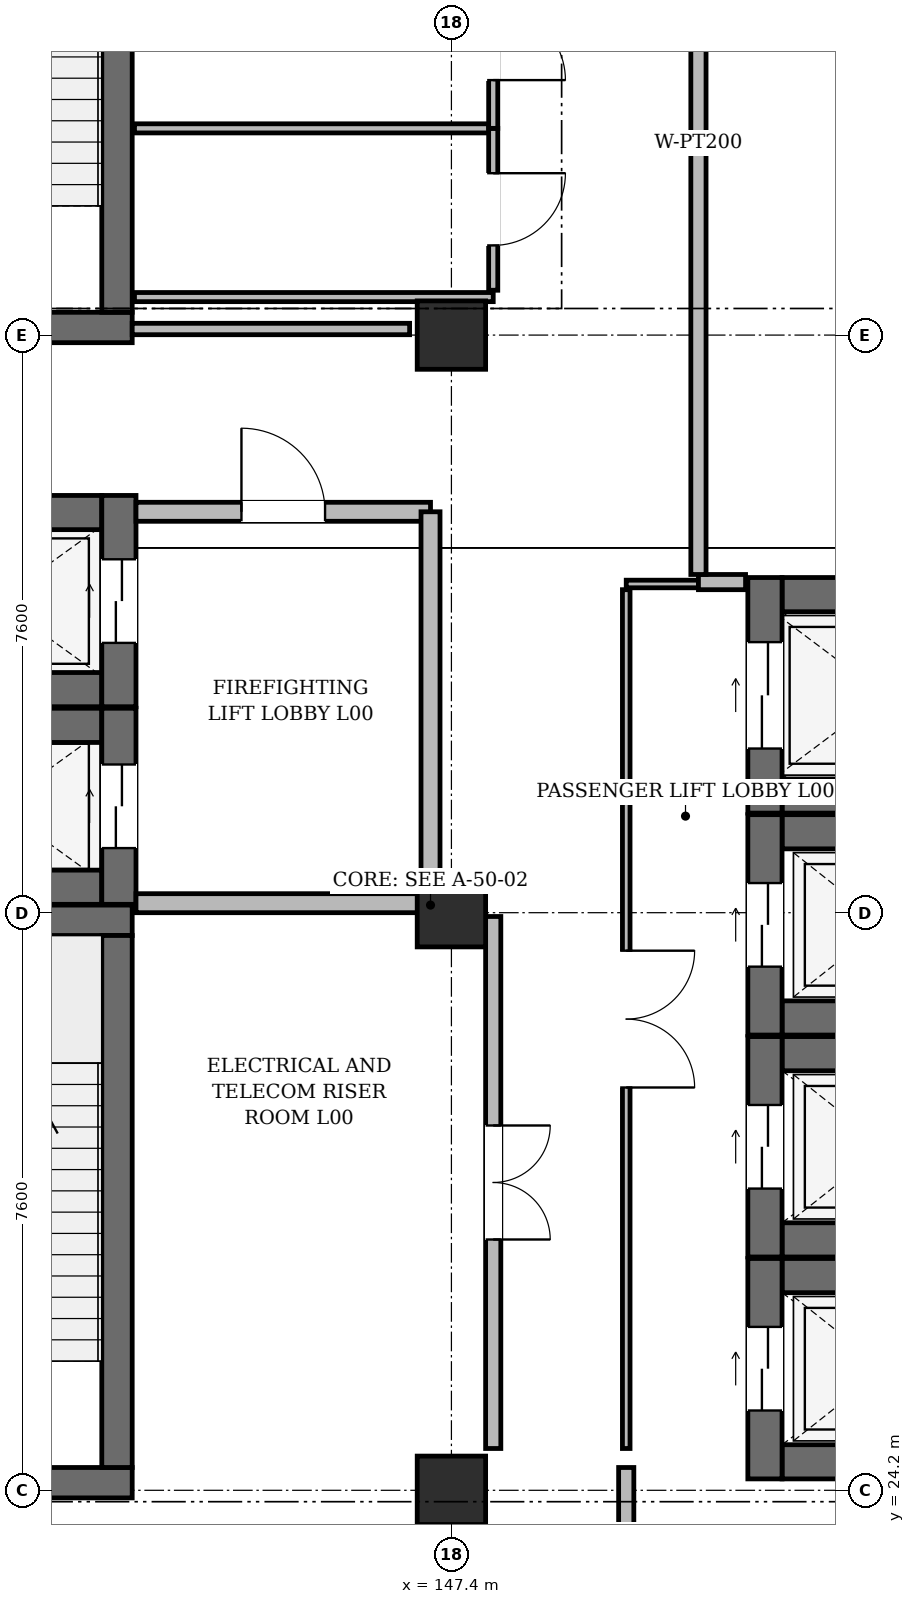
"""IFC4 building model, lengths in metres.
Left out: names, types, materials, properties, quantities, classifications, styles, units other than length and angle.
Written with IfcOpenShell. Run it as: python <this file> out.ifc"""

import sys

from ifc_helpers import new_model, si_unit, direction, frame, frame_2d, origin, origin_2d, place, context, subcontext, project, spatial, rectangle, extrude, element, fill, save


model = new_model("IFC4")
c1 = context("Model", 3, precision=1e-05, world=origin(), true_north=direction((0.0, 1.0)))
c2 = subcontext(c1, "Body", "Model", "MODEL_VIEW")
j1 = project(units=[si_unit("LENGTHUNIT", "METRE"), si_unit("PLANEANGLEUNIT", "RADIAN")], contexts=[c1])
p1 = place(None, origin())
s1 = spatial("IfcSite", under=j1, at=p1, CompositionType="ELEMENT")
p2 = place(p1, origin())
s2 = spatial("IfcBuilding", under=s1, at=p2, CompositionType="ELEMENT")
p3 = place(p2, origin())
s3 = spatial("IfcBuildingStorey", under=s2, at=p3, CompositionType="ELEMENT", Elevation=0.0)
for number, where, z_axis, x_axis in (
    (1, (147.4, 24.2, 0.0), (0.0, 0.0, 1.0), (1.0, 0.0, 0.0)),
    (2, (147.4, 31.8, 0.0), (0.0, 0.0, 1.0), (1.0, 0.0, 0.0)),
    (3, (147.4, 39.4, 0.0), (0.0, 0.0, 1.0), (1.0, 0.0, 0.0)),
):
    element("IfcColumn", number, at=place(p3, frame(where, z_axis=z_axis, x_axis=x_axis)), inside=s3, PredefinedType="COLUMN", context=c2, shape_type="SweptSolid", body=[
        extrude(rectangle(XDim=0.9, YDim=0.9, at=origin_2d()), origin(), (0.0, 0.0, 1.0), 5.1),
    ])
p4 = place(p3, frame((139.4, 24.3, 0.0), z_axis=(0.0, 0.0, 1.0), x_axis=(1.0, 0.0, 0.0)))
e4 = element("IfcWall", 4, at=p4, inside=s3, PredefinedType="SHEAR", context=c2, shape_type="SweptSolid", body=[
    extrude(rectangle(XDim=3.8, YDim=0.4, at=frame_2d((1.9, 0.0))), origin(), (0.0, 0.0, 1.0), 5.1),
])
p5 = place(p4, frame((1.3, 0.0, 0.0)))
e5 = element("IfcOpeningElement", 5, at=p5, cuts=e4, PredefinedType="OPENING", context=c2, shape_type="SweptSolid", body=[
    extrude(rectangle(XDim=1.2, YDim=2.2, at=frame_2d((0.6, 1.1))), frame((0.0, 0.212, 0.0), z_axis=(0.0, -1.0, 0.0), x_axis=(1.0, 0.0, 0.0)), (0.0, 0.0, 1.0), 0.424),
])
p6 = place(p3, frame((139.4, 31.7, 0.0), z_axis=(0.0, 0.0, 1.0), x_axis=(1.0, 0.0, 0.0)))
e6 = element("IfcWall", 6, at=p6, inside=s3, PredefinedType="SHEAR", context=c2, shape_type="SweptSolid", body=[
    extrude(rectangle(XDim=3.8, YDim=0.4, at=frame_2d((1.9, 0.0))), origin(), (0.0, 0.0, 1.0), 5.1),
])
p7 = place(p3, frame((143.0, 24.5, 0.0), z_axis=(0.0, 0.0, 1.0), x_axis=(0.0, 1.0, 0.0)))
e7 = element("IfcWall", 7, at=p7, inside=s3, PredefinedType="SHEAR", context=c2, shape_type="SweptSolid", body=[
    extrude(rectangle(XDim=7.0, YDim=0.4, at=frame_2d((3.5, 0.0))), origin(), (0.0, 0.0, 1.0), 5.1),
])
p8 = place(p3, frame((139.4, 39.5, 0.0), z_axis=(0.0, 0.0, 1.0), x_axis=(1.0, 0.0, 0.0)))
e8 = element("IfcWall", 8, at=p8, inside=s3, PredefinedType="SHEAR", context=c2, shape_type="SweptSolid", body=[
    extrude(rectangle(XDim=3.8, YDim=0.4, at=frame_2d((1.9, 0.0))), origin(), (0.0, 0.0, 1.0), 5.1),
])
p9 = place(p8, frame((1.3, 0.0, 0.0)))
e9 = element("IfcOpeningElement", 9, at=p9, cuts=e8, PredefinedType="OPENING", context=c2, shape_type="SweptSolid", body=[
    extrude(rectangle(XDim=1.2, YDim=2.2, at=frame_2d((0.6, 1.1))), frame((0.0, 0.212, 0.0), z_axis=(0.0, -1.0, 0.0), x_axis=(1.0, 0.0, 0.0)), (0.0, 0.0, 1.0), 0.424),
])
p10 = place(p3, frame((143.0, 39.7, 0.0), z_axis=(0.0, 0.0, 1.0), x_axis=(0.0, 1.0, 0.0)))
e10 = element("IfcWall", 10, at=p10, inside=s3, PredefinedType="SHEAR", context=c2, shape_type="SweptSolid", body=[
    extrude(rectangle(XDim=7.0, YDim=0.4, at=frame_2d((3.5, 0.0))), origin(), (0.0, 0.0, 1.0), 5.1),
])
for number, where, z_axis, x_axis in (
    (11, (140.06, 32.135, 0.0), (0.0, 0.0, 1.0), (1.0, 0.0, 0.0)),
    (12, (140.06, 34.265, 0.0), (0.0, 0.0, 1.0), (1.0, 0.0, 0.0)),
):
    element("IfcWall", number, at=place(p3, frame(where, z_axis=z_axis, x_axis=x_axis)), inside=s3, PredefinedType="SHEAR", context=c2, shape_type="SweptSolid", body=[
        extrude(rectangle(XDim=2.74, YDim=0.45, at=frame_2d((1.37, 0.0))), origin(), (0.0, 0.0, 1.0), 5.1),
    ])
p11 = place(p3, frame((143.025, 31.91, 0.0), z_axis=(0.0, 0.0, 1.0), x_axis=(0.0, 1.0, 0.0)))
e13 = element("IfcWall", 13, at=p11, inside=s3, PredefinedType="SHEAR", context=c2, shape_type="SweptSolid", body=[
    extrude(rectangle(XDim=2.58, YDim=0.45, at=frame_2d((1.29, 0.0))), origin(), (0.0, 0.0, 1.0), 5.1),
])
p12 = place(p11, frame((0.74, 0.0, 0.0)))
e14 = element("IfcOpeningElement", 14, at=p12, cuts=e13, PredefinedType="OPENING", context=c2, shape_type="SweptSolid", body=[
    extrude(rectangle(XDim=1.1, YDim=2.2, at=frame_2d((0.55, 1.1))), frame((0.0, 0.237, 0.0), z_axis=(0.0, -1.0, 0.0), x_axis=(1.0, 0.0, 0.0)), (0.0, 0.0, 1.0), 0.474),
])
for number, where, z_axis, x_axis in (
    (15, (140.06, 34.735, 0.0), (0.0, 0.0, 1.0), (1.0, 0.0, 0.0)),
    (16, (140.06, 37.065, 0.0), (0.0, 0.0, 1.0), (1.0, 0.0, 0.0)),
):
    element("IfcWall", number, at=place(p3, frame(where, z_axis=z_axis, x_axis=x_axis)), inside=s3, PredefinedType="SHEAR", context=c2, shape_type="SweptSolid", body=[
        extrude(rectangle(XDim=2.74, YDim=0.45, at=frame_2d((1.37, 0.0))), origin(), (0.0, 0.0, 1.0), 5.1),
    ])
p13 = place(p3, frame((143.025, 34.51, 0.0), z_axis=(0.0, 0.0, 1.0), x_axis=(0.0, 1.0, 0.0)))
e17 = element("IfcWall", 17, at=p13, inside=s3, PredefinedType="SHEAR", context=c2, shape_type="SweptSolid", body=[
    extrude(rectangle(XDim=2.78, YDim=0.45, at=frame_2d((1.39, 0.0))), origin(), (0.0, 0.0, 1.0), 5.1),
])
p14 = place(p13, frame((0.84, 0.0, 0.0)))
e18 = element("IfcOpeningElement", 18, at=p14, cuts=e17, PredefinedType="OPENING", context=c2, shape_type="SweptSolid", body=[
    extrude(rectangle(XDim=1.1, YDim=2.2, at=frame_2d((0.55, 1.1))), frame((0.0, 0.237, 0.0), z_axis=(0.0, -1.0, 0.0), x_axis=(1.0, 0.0, 0.0)), (0.0, 0.0, 1.0), 0.474),
])
for number, where, z_axis, x_axis in (
    (19, (151.75, 24.575, 0.0), (0.0, 0.0, 1.0), (1.0, 0.0, 0.0)),
    (20, (151.75, 27.025, 0.0), (0.0, 0.0, 1.0), (1.0, 0.0, 0.0)),
):
    element("IfcWall", number, at=place(p3, frame(where, z_axis=z_axis, x_axis=x_axis)), inside=s3, PredefinedType="SHEAR", context=c2, shape_type="SweptSolid", body=[
        extrude(rectangle(XDim=2.7, YDim=0.45, at=frame_2d((1.35, 0.0))), origin(), (0.0, 0.0, 1.0), 5.1),
    ])
p15 = place(p3, frame((151.525, 24.35, 0.0), z_axis=(0.0, 0.0, 1.0), x_axis=(0.0, 1.0, 0.0)))
e21 = element("IfcWall", 21, at=p15, inside=s3, PredefinedType="SHEAR", context=c2, shape_type="SweptSolid", body=[
    extrude(rectangle(XDim=2.9, YDim=0.45, at=frame_2d((1.45, 0.0))), origin(), (0.0, 0.0, 1.0), 5.1),
])
p16 = place(p15, frame((0.9, 0.0, 0.0)))
e22 = element("IfcOpeningElement", 22, at=p16, cuts=e21, PredefinedType="OPENING", context=c2, shape_type="SweptSolid", body=[
    extrude(rectangle(XDim=1.1, YDim=2.2, at=frame_2d((0.55, 1.1))), frame((0.0, 0.237, 0.0), z_axis=(0.0, -1.0, 0.0), x_axis=(1.0, 0.0, 0.0)), (0.0, 0.0, 1.0), 0.474),
])
for number, where, z_axis, x_axis in (
    (23, (151.75, 27.495, 0.0), (0.0, 0.0, 1.0), (1.0, 0.0, 0.0)),
    (24, (151.75, 29.945, 0.0), (0.0, 0.0, 1.0), (1.0, 0.0, 0.0)),
):
    element("IfcWall", number, at=place(p3, frame(where, z_axis=z_axis, x_axis=x_axis)), inside=s3, PredefinedType="SHEAR", context=c2, shape_type="SweptSolid", body=[
        extrude(rectangle(XDim=2.7, YDim=0.45, at=frame_2d((1.35, 0.0))), origin(), (0.0, 0.0, 1.0), 5.1),
    ])
p17 = place(p3, frame((151.525, 27.27, 0.0), z_axis=(0.0, 0.0, 1.0), x_axis=(0.0, 1.0, 0.0)))
e25 = element("IfcWall", 25, at=p17, inside=s3, PredefinedType="SHEAR", context=c2, shape_type="SweptSolid", body=[
    extrude(rectangle(XDim=2.9, YDim=0.45, at=frame_2d((1.45, 0.0))), origin(), (0.0, 0.0, 1.0), 5.1),
])
p18 = place(p17, frame((0.9, 0.0, 0.0)))
e26 = element("IfcOpeningElement", 26, at=p18, cuts=e25, PredefinedType="OPENING", context=c2, shape_type="SweptSolid", body=[
    extrude(rectangle(XDim=1.1, YDim=2.2, at=frame_2d((0.55, 1.1))), frame((0.0, 0.237, 0.0), z_axis=(0.0, -1.0, 0.0), x_axis=(1.0, 0.0, 0.0)), (0.0, 0.0, 1.0), 0.474),
])
for number, where, z_axis, x_axis in (
    (27, (151.75, 30.415, 0.0), (0.0, 0.0, 1.0), (1.0, 0.0, 0.0)),
    (28, (151.75, 32.865, 0.0), (0.0, 0.0, 1.0), (1.0, 0.0, 0.0)),
):
    element("IfcWall", number, at=place(p3, frame(where, z_axis=z_axis, x_axis=x_axis)), inside=s3, PredefinedType="SHEAR", context=c2, shape_type="SweptSolid", body=[
        extrude(rectangle(XDim=2.7, YDim=0.45, at=frame_2d((1.35, 0.0))), origin(), (0.0, 0.0, 1.0), 5.1),
    ])
p19 = place(p3, frame((151.525, 30.19, 0.0), z_axis=(0.0, 0.0, 1.0), x_axis=(0.0, 1.0, 0.0)))
e29 = element("IfcWall", 29, at=p19, inside=s3, PredefinedType="SHEAR", context=c2, shape_type="SweptSolid", body=[
    extrude(rectangle(XDim=2.9, YDim=0.45, at=frame_2d((1.45, 0.0))), origin(), (0.0, 0.0, 1.0), 5.1),
])
p20 = place(p19, frame((0.9, 0.0, 0.0)))
e30 = element("IfcOpeningElement", 30, at=p20, cuts=e29, PredefinedType="OPENING", context=c2, shape_type="SweptSolid", body=[
    extrude(rectangle(XDim=1.1, YDim=2.2, at=frame_2d((0.55, 1.1))), frame((0.0, 0.237, 0.0), z_axis=(0.0, -1.0, 0.0), x_axis=(1.0, 0.0, 0.0)), (0.0, 0.0, 1.0), 0.474),
])
for number, where, z_axis, x_axis in (
    (31, (151.75, 33.335, 0.0), (0.0, 0.0, 1.0), (1.0, 0.0, 0.0)),
    (32, (151.75, 35.985, 0.0), (0.0, 0.0, 1.0), (1.0, 0.0, 0.0)),
):
    element("IfcWall", number, at=place(p3, frame(where, z_axis=z_axis, x_axis=x_axis)), inside=s3, PredefinedType="SHEAR", context=c2, shape_type="SweptSolid", body=[
        extrude(rectangle(XDim=2.7, YDim=0.45, at=frame_2d((1.35, 0.0))), origin(), (0.0, 0.0, 1.0), 5.1),
    ])
p21 = place(p3, frame((151.525, 33.11, 0.0), z_axis=(0.0, 0.0, 1.0), x_axis=(0.0, 1.0, 0.0)))
e33 = element("IfcWall", 33, at=p21, inside=s3, PredefinedType="SHEAR", context=c2, shape_type="SweptSolid", body=[
    extrude(rectangle(XDim=3.1, YDim=0.45, at=frame_2d((1.55, 0.0))), origin(), (0.0, 0.0, 1.0), 5.1),
])
p22 = place(p21, frame((0.85, 0.0, 0.0)))
e34 = element("IfcOpeningElement", 34, at=p22, cuts=e33, PredefinedType="OPENING", context=c2, shape_type="SweptSolid", body=[
    extrude(rectangle(XDim=1.4, YDim=2.3, at=frame_2d((0.7, 1.15))), frame((0.0, 0.237, 0.0), z_axis=(0.0, -1.0, 0.0), x_axis=(1.0, 0.0, 0.0)), (0.0, 0.0, 1.0), 0.474),
])
p23 = place(p3, frame((143.25, 37.075, 0.0), z_axis=(0.0, 0.0, 1.0), x_axis=(1.0, 0.0, 0.0)))
e35 = element("IfcWall", 35, at=p23, inside=s3, PredefinedType="SOLIDWALL", context=c2, shape_type="SweptSolid", body=[
    extrude(rectangle(XDim=3.875, YDim=0.25, at=frame_2d((1.938, 0.0))), origin(), (0.0, 0.0, 1.0), 5.005),
])
p24 = place(p23, frame((1.387, 0.0, 0.0)))
e36 = element("IfcOpeningElement", 36, at=p24, cuts=e35, PredefinedType="OPENING", context=c2, shape_type="SweptSolid", body=[
    extrude(rectangle(XDim=1.1, YDim=2.2, at=frame_2d((0.55, 1.1))), frame((0.0, 0.137, 0.0), z_axis=(0.0, -1.0, 0.0), x_axis=(1.0, 0.0, 0.0)), (0.0, 0.0, 1.0), 0.274),
])
p25 = place(p3, frame((143.25, 31.925, 0.0), z_axis=(0.0, 0.0, 1.0), x_axis=(1.0, 0.0, 0.0)))
e37 = element("IfcWall", 37, at=p25, inside=s3, PredefinedType="SOLIDWALL", context=c2, shape_type="SweptSolid", body=[
    extrude(rectangle(XDim=3.875, YDim=0.25, at=frame_2d((1.938, 0.0))), origin(), (0.0, 0.0, 1.0), 4.335),
])
p26 = place(p3, frame((147.125, 31.925, 0.0), z_axis=(0.0, 0.0, 1.0), x_axis=(0.0, 1.0, 0.0)))
e38 = element("IfcWall", 38, at=p26, inside=s3, PredefinedType="SOLIDWALL", context=c2, shape_type="SweptSolid", body=[
    extrude(rectangle(XDim=5.15, YDim=0.25, at=frame_2d((2.575, 0.0))), origin(), (0.0, 0.0, 1.0), 4.335),
])
p27 = place(p3, frame((143.23, 39.9, 0.0), z_axis=(0.0, 0.0, 1.0), x_axis=(1.0, 0.0, 0.0)))
e39 = element("IfcWall", 39, at=p27, inside=s3, PredefinedType="PARTITIONING", context=c2, shape_type="SweptSolid", body=[
    extrude(rectangle(XDim=4.72, YDim=0.12, at=frame_2d((2.36, 0.0))), origin(), (0.0, 0.0, 1.0), 5.005),
])
p28 = place(p3, frame((147.95, 31.75, 0.0), z_axis=(0.0, 0.0, 1.0), x_axis=(0.0, -1.0, 0.0)))
e40 = element("IfcWall", 40, at=p28, inside=s3, PredefinedType="PARTITIONING", context=c2, shape_type="SweptSolid", body=[
    extrude(rectangle(XDim=7.0, YDim=0.2, at=frame_2d((3.5, 0.0))), origin(), (0.0, 0.0, 1.0), 5.005),
])
p29 = place(p28, frame((2.75, 0.0, 0.0)))
e41 = element("IfcOpeningElement", 41, at=p29, cuts=e40, PredefinedType="OPENING", context=c2, shape_type="SweptSolid", body=[
    extrude(rectangle(XDim=1.5, YDim=2.2, at=frame_2d((0.75, 1.1))), frame((0.0, 0.112, 0.0), z_axis=(0.0, -1.0, 0.0), x_axis=(1.0, 0.0, 0.0)), (0.0, 0.0, 1.0), 0.224),
])
p30 = place(p3, frame((149.7, 24.75, 0.0), z_axis=(0.0, 0.0, 1.0), x_axis=(0.0, 1.0, 0.0)))
e42 = element("IfcWall", 42, at=p30, inside=s3, PredefinedType="PARTITIONING", context=c2, shape_type="SweptSolid", body=[
    extrude(rectangle(XDim=11.3, YDim=0.1, at=frame_2d((5.65, 0.0))), origin(), (0.0, 0.0, 1.0), 5.005),
])
p31 = place(p30, frame((4.75, 0.0, 0.0)))
e43 = element("IfcOpeningElement", 43, at=p31, cuts=e42, PredefinedType="OPENING", context=c2, shape_type="SweptSolid", body=[
    extrude(rectangle(XDim=1.8, YDim=2.4, at=frame_2d((0.9, 1.2))), frame((0.0, 0.062, 0.0), z_axis=(0.0, -1.0, 0.0), x_axis=(1.0, 0.0, 0.0)), (0.0, 0.0, 1.0), 0.124),
])
p32 = place(p3, frame((149.7, 36.125, 0.0), z_axis=(0.0, 0.0, 1.0), x_axis=(1.0, 0.0, 0.0)))
e44 = element("IfcWall", 44, at=p32, inside=s3, PredefinedType="PARTITIONING", context=c2, shape_type="SweptSolid", body=[
    extrude(rectangle(XDim=0.95, YDim=0.1, at=frame_2d((0.475, 0.0))), origin(), (0.0, 0.0, 1.0), 5.005),
])
p33 = place(p3, frame((150.65, 36.15, 0.0), z_axis=(0.0, 0.0, 1.0), x_axis=(1.0, 0.0, 0.0)))
e45 = element("IfcWall", 45, at=p33, inside=s3, PredefinedType="PARTITIONING", context=c2, shape_type="SweptSolid", body=[
    extrude(rectangle(XDim=0.62, YDim=0.2, at=frame_2d((0.31, 0.0))), origin(), (0.0, 0.0, 1.0), 5.005),
])
p34 = place(p3, frame((143.23, 42.12, 0.0), z_axis=(0.0, 0.0, 1.0), x_axis=(1.0, 0.0, 0.0)))
e46 = element("IfcWall", 46, at=p34, inside=s3, PredefinedType="PARTITIONING", context=c2, shape_type="SweptSolid", body=[
    extrude(rectangle(XDim=4.72, YDim=0.12, at=frame_2d((2.36, 0.0))), origin(), (0.0, 0.0, 1.0), 4.575),
])
p35 = place(p3, frame((147.95, 42.12, 0.0), z_axis=(0.0, 0.0, 1.0), x_axis=(0.0, -1.0, 0.0)))
e47 = element("IfcWall", 47, at=p35, inside=s3, PredefinedType="PARTITIONING", context=c2, shape_type="SweptSolid", body=[
    extrude(rectangle(XDim=2.13, YDim=0.12, at=frame_2d((1.065, 0.0))), origin(), (0.0, 0.0, 1.0), 5.005),
])
p36 = place(p35, frame((0.59, 0.0, 0.0)))
e48 = element("IfcOpeningElement", 48, at=p36, cuts=e47, PredefinedType="OPENING", context=c2, shape_type="SweptSolid", body=[
    extrude(rectangle(XDim=0.95, YDim=2.15, at=frame_2d((0.475, 1.075))), frame((0.0, 0.072, 0.0), z_axis=(0.0, -1.0, 0.0), x_axis=(1.0, 0.0, 0.0)), (0.0, 0.0, 1.0), 0.144),
])
p37 = place(p3, frame((147.95, 44.34, 0.0), z_axis=(0.0, 0.0, 1.0), x_axis=(0.0, -1.0, 0.0)))
e49 = element("IfcWall", 49, at=p37, inside=s3, PredefinedType="PARTITIONING", context=c2, shape_type="SweptSolid", body=[
    extrude(rectangle(XDim=2.22, YDim=0.12, at=frame_2d((1.11, 0.0))), origin(), (0.0, 0.0, 1.0), 5.005),
])
p38 = place(p37, frame((0.635, 0.0, 0.0)))
e50 = element("IfcOpeningElement", 50, at=p38, cuts=e49, PredefinedType="OPENING", context=c2, shape_type="SweptSolid", body=[
    extrude(rectangle(XDim=0.95, YDim=2.15, at=frame_2d((0.475, 1.075))), frame((0.0, 0.072, 0.0), z_axis=(0.0, -1.0, 0.0), x_axis=(1.0, 0.0, 0.0)), (0.0, 0.0, 1.0), 0.144),
])
p39 = place(p3, frame((149.7, 24.5, 0.0), z_axis=(0.0, 0.0, 1.0), x_axis=(0.0, -1.0, 0.0)))
e51 = element("IfcWall", 51, at=p39, inside=s3, PredefinedType="PARTITIONING", context=c2, shape_type="SweptSolid", body=[
    extrude(rectangle(XDim=0.8, YDim=0.2, at=frame_2d((0.4, 0.0))), origin(), (0.0, 0.0, 1.0), 5.005),
])
p40 = place(p3, frame((150.65, 47.6, 0.0), z_axis=(0.0, 0.0, 1.0), x_axis=(0.0, -1.0, 0.0)))
e52 = element("IfcWall", 52, at=p40, inside=s3, PredefinedType="PARTITIONING", context=c2, shape_type="SweptSolid", body=[
    extrude(rectangle(XDim=11.35, YDim=0.2, at=frame_2d((5.675, 0.0))), origin(), (0.0, 0.0, 1.0), 5.005),
])
p41 = place(p3, frame((143.2, 39.48, 0.0), z_axis=(0.0, 0.0, 1.0), x_axis=(1.0, 0.0, 0.0)))
e53 = element("IfcWall", 53, at=p41, inside=s3, PredefinedType="PARTITIONING", context=c2, shape_type="SweptSolid", body=[
    extrude(rectangle(XDim=3.65, YDim=0.15, at=frame_2d((1.825, 0.0))), origin(), (0.0, 0.0, 1.0), 4.335),
])
p42 = place(p12, origin())
e54 = element("IfcDoor", 54, at=p42, inside=s3, OperationType="DOUBLE_DOOR_SLIDING", PredefinedType="DOOR", context=c2, shape_type="SweptSolid", body=[
    extrude(rectangle(XDim=1.1, YDim=2.2, at=frame_2d((0.55, 1.1))), frame((0.0, 0.025, 0.0), z_axis=(0.0, -1.0, 0.0), x_axis=(1.0, 0.0, 0.0)), (0.0, 0.0, 1.0), 0.05),
])
fill(e14, e54)
p43 = place(p14, origin())
e55 = element("IfcDoor", 55, at=p43, inside=s3, OperationType="DOUBLE_DOOR_SLIDING", PredefinedType="DOOR", context=c2, shape_type="SweptSolid", body=[
    extrude(rectangle(XDim=1.1, YDim=2.2, at=frame_2d((0.55, 1.1))), frame((0.0, 0.025, 0.0), z_axis=(0.0, -1.0, 0.0), x_axis=(1.0, 0.0, 0.0)), (0.0, 0.0, 1.0), 0.05),
])
fill(e18, e55)
p44 = place(p16, origin())
e56 = element("IfcDoor", 56, at=p44, inside=s3, OperationType="DOUBLE_DOOR_SLIDING", PredefinedType="DOOR", context=c2, shape_type="SweptSolid", body=[
    extrude(rectangle(XDim=1.1, YDim=2.2, at=frame_2d((0.55, 1.1))), frame((0.0, 0.025, 0.0), z_axis=(0.0, -1.0, 0.0), x_axis=(1.0, 0.0, 0.0)), (0.0, 0.0, 1.0), 0.05),
])
fill(e22, e56)
p45 = place(p18, origin())
e57 = element("IfcDoor", 57, at=p45, inside=s3, OperationType="DOUBLE_DOOR_SLIDING", PredefinedType="DOOR", context=c2, shape_type="SweptSolid", body=[
    extrude(rectangle(XDim=1.1, YDim=2.2, at=frame_2d((0.55, 1.1))), frame((0.0, 0.025, 0.0), z_axis=(0.0, -1.0, 0.0), x_axis=(1.0, 0.0, 0.0)), (0.0, 0.0, 1.0), 0.05),
])
fill(e26, e57)
p46 = place(p20, origin())
e58 = element("IfcDoor", 58, at=p46, inside=s3, OperationType="DOUBLE_DOOR_SLIDING", PredefinedType="DOOR", context=c2, shape_type="SweptSolid", body=[
    extrude(rectangle(XDim=1.1, YDim=2.2, at=frame_2d((0.55, 1.1))), frame((0.0, 0.025, 0.0), z_axis=(0.0, -1.0, 0.0), x_axis=(1.0, 0.0, 0.0)), (0.0, 0.0, 1.0), 0.05),
])
fill(e30, e58)
p47 = place(p22, origin())
e59 = element("IfcDoor", 59, at=p47, inside=s3, OperationType="DOUBLE_DOOR_SLIDING", PredefinedType="DOOR", context=c2, shape_type="SweptSolid", body=[
    extrude(rectangle(XDim=1.4, YDim=2.3, at=frame_2d((0.7, 1.15))), frame((0.0, 0.025, 0.0), z_axis=(0.0, -1.0, 0.0), x_axis=(1.0, 0.0, 0.0)), (0.0, 0.0, 1.0), 0.05),
])
fill(e34, e59)
p48 = place(p24, origin())
e60 = element("IfcDoor", 60, at=p48, inside=s3, OperationType="SINGLE_SWING_LEFT", PredefinedType="DOOR", context=c2, shape_type="SweptSolid", body=[
    extrude(rectangle(XDim=1.1, YDim=2.2, at=frame_2d((0.55, 1.1))), frame((0.0, 0.025, 0.0), z_axis=(0.0, -1.0, 0.0), x_axis=(1.0, 0.0, 0.0)), (0.0, 0.0, 1.0), 0.05),
])
fill(e36, e60)
p49 = place(p29, origin())
e61 = element("IfcDoor", 61, at=p49, inside=s3, OperationType="DOUBLE_DOOR_SINGLE_SWING", PredefinedType="DOOR", context=c2, shape_type="SweptSolid", body=[
    extrude(rectangle(XDim=1.5, YDim=2.2, at=frame_2d((0.75, 1.1))), frame((0.0, 0.025, 0.0), z_axis=(0.0, -1.0, 0.0), x_axis=(1.0, 0.0, 0.0)), (0.0, 0.0, 1.0), 0.05),
])
fill(e41, e61)
p50 = place(p31, frame((1.8, 0.0, 0.0), z_axis=(0.0, 0.0, 1.0), x_axis=(-1.0, 0.0, 0.0)))
e62 = element("IfcDoor", 62, at=p50, inside=s3, OperationType="DOUBLE_DOOR_SINGLE_SWING", PredefinedType="DOOR", context=c2, shape_type="SweptSolid", body=[
    extrude(rectangle(XDim=1.8, YDim=2.4, at=frame_2d((0.9, 1.2))), frame((0.0, 0.025, 0.0), z_axis=(0.0, -1.0, 0.0), x_axis=(1.0, 0.0, 0.0)), (0.0, 0.0, 1.0), 0.05),
])
fill(e43, e62)
p51 = place(p36, origin())
e63 = element("IfcDoor", 63, at=p51, inside=s3, OperationType="SINGLE_SWING_LEFT", PredefinedType="DOOR", context=c2, shape_type="SweptSolid", body=[
    extrude(rectangle(XDim=0.95, YDim=2.15, at=frame_2d((0.475, 1.075))), frame((0.0, 0.025, 0.0), z_axis=(0.0, -1.0, 0.0), x_axis=(1.0, 0.0, 0.0)), (0.0, 0.0, 1.0), 0.05),
])
fill(e48, e63)
p52 = place(p38, origin())
e64 = element("IfcDoor", 64, at=p52, inside=s3, OperationType="SINGLE_SWING_RIGHT", PredefinedType="DOOR", context=c2, shape_type="SweptSolid", body=[
    extrude(rectangle(XDim=0.95, YDim=2.15, at=frame_2d((0.475, 1.075))), frame((0.0, 0.025, 0.0), z_axis=(0.0, -1.0, 0.0), x_axis=(1.0, 0.0, 0.0)), (0.0, 0.0, 1.0), 0.05),
])
fill(e50, e64)
save(model, sys.argv[1])
